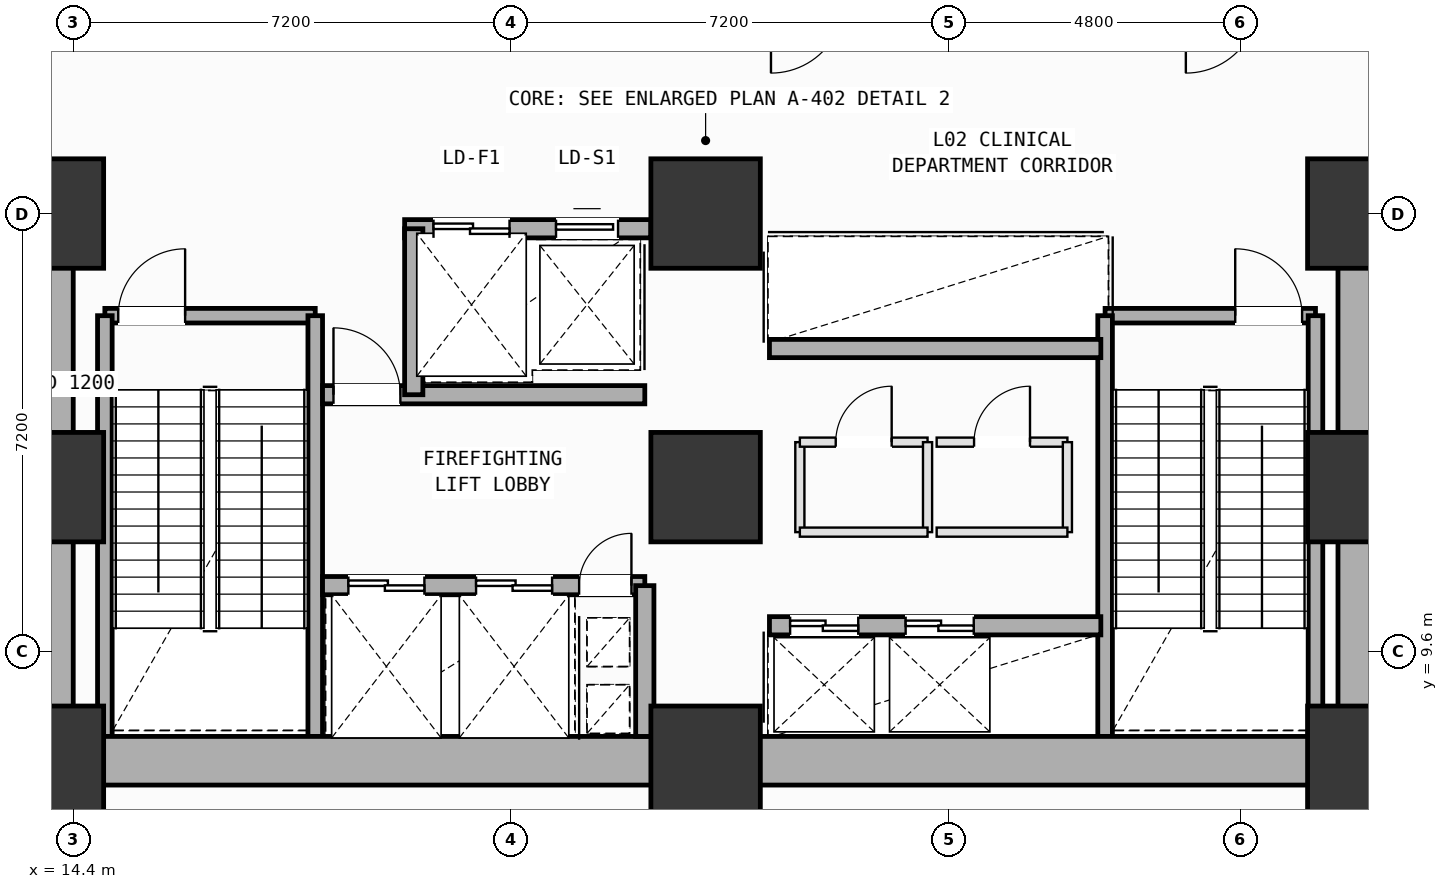
"""IFC4 building model, lengths in metres.
Left out: names, types, materials, properties, quantities, classifications, styles, units other than length and angle.
Written with IfcOpenShell. Run it as: python <this file> out.ifc"""

import sys

from ifc_helpers import new_model, si_unit, direction, frame, frame_2d, origin, origin_2d, place, context, subcontext, project, spatial, rectangle, extrude, element, fill, save


model = new_model("IFC4")
c1 = context("Model", 3, precision=1e-05, world=origin(), true_north=direction((0.0, 1.0)))
c2 = subcontext(c1, "Body", "Model", "MODEL_VIEW")
j1 = project(units=[si_unit("LENGTHUNIT", "METRE"), si_unit("PLANEANGLEUNIT", "RADIAN")], contexts=[c1])
p1 = place(None, origin())
s1 = spatial("IfcSite", under=j1, at=p1, CompositionType="ELEMENT")
p2 = place(p1, origin())
s2 = spatial("IfcBuilding", under=s1, at=p2, CompositionType="ELEMENT")
p3 = place(p2, frame((0.0, 0.0, 10.8)))
s3 = spatial("IfcBuildingStorey", under=s2, at=p3, CompositionType="ELEMENT", Elevation=10.8)
for number, where, z_axis, x_axis in (
    (1, (14.0, 7.8, 0.0), (0.0, 0.0, 1.0), (1.0, 0.0, 0.0)),
    (2, (14.0, 12.3, 0.0), (0.0, 0.0, 1.0), (1.0, 0.0, 0.0)),
    (3, (14.0, 16.8, 0.0), (0.0, 0.0, 1.0), (1.0, 0.0, 0.0)),
    (4, (24.8, 7.8, 0.0), (0.0, 0.0, 1.0), (1.0, 0.0, 0.0)),
    (5, (24.8, 12.3, 0.0), (0.0, 0.0, 1.0), (1.0, 0.0, 0.0)),
    (6, (24.8, 16.8, 0.0), (0.0, 0.0, 1.0), (1.0, 0.0, 0.0)),
    (7, (35.6, 7.8, 0.0), (0.0, 0.0, 1.0), (1.0, 0.0, 0.0)),
    (8, (35.6, 12.3, 0.0), (0.0, 0.0, 1.0), (1.0, 0.0, 0.0)),
    (9, (35.6, 16.8, 0.0), (0.0, 0.0, 1.0), (1.0, 0.0, 0.0)),
):
    element("IfcColumn", number, at=place(p3, frame(where, z_axis=z_axis, x_axis=x_axis)), inside=s3, PredefinedType="COLUMN", context=c2, shape_type="SweptSolid", body=[
        extrude(rectangle(XDim=1.8, YDim=1.8, at=origin_2d()), origin(), (0.0, 0.0, 1.0), 5.4),
    ])
p4 = place(p3, frame((14.92, 15.12, 0.0), z_axis=(0.0, 0.0, 1.0), x_axis=(1.0, 0.0, 0.0)))
e10 = element("IfcWall", 10, at=p4, inside=s3, PredefinedType="SOLIDWALL", context=c2, shape_type="SweptSolid", body=[
    extrude(rectangle(XDim=3.46, YDim=0.24, at=frame_2d((1.73, 0.0))), origin(), (0.0, 0.0, 1.0), 5.15),
])
p5 = place(p4, frame((0.22, 0.0, 0.0)))
e11 = element("IfcOpeningElement", 11, at=p5, cuts=e10, PredefinedType="OPENING", context=c2, shape_type="SweptSolid", body=[
    extrude(rectangle(XDim=1.1, YDim=2.15, at=frame_2d((0.55, 1.075))), frame((0.0, 0.13, 0.0), z_axis=(0.0, -1.0, 0.0), x_axis=(1.0, 0.0, 0.0)), (0.0, 0.0, 1.0), 0.26),
])
for number, where, z_axis, x_axis in (
    (12, (18.38, 15.12, 0.0), (0.0, 0.0, 1.0), (0.0, -1.0, 0.0)),
    (13, (14.92, 8.2, 0.0), (0.0, 0.0, 1.0), (0.0, 1.0, 0.0)),
):
    element("IfcWall", number, at=place(p3, frame(where, z_axis=z_axis, x_axis=x_axis)), inside=s3, PredefinedType="SOLIDWALL", context=c2, shape_type="SweptSolid", body=[
        extrude(rectangle(XDim=6.92, YDim=0.24, at=frame_2d((3.46, 0.0))), origin(), (0.0, 0.0, 1.0), 5.15),
    ])
p6 = place(p3, frame((31.37, 15.12, 0.0), z_axis=(0.0, 0.0, 1.0), x_axis=(1.0, 0.0, 0.0)))
e14 = element("IfcWall", 14, at=p6, inside=s3, PredefinedType="SOLIDWALL", context=c2, shape_type="SweptSolid", body=[
    extrude(rectangle(XDim=3.46, YDim=0.24, at=frame_2d((1.73, 0.0))), origin(), (0.0, 0.0, 1.0), 5.15),
])
p7 = place(p6, frame((2.14, 0.0, 0.0)))
e15 = element("IfcOpeningElement", 15, at=p7, cuts=e14, PredefinedType="OPENING", context=c2, shape_type="SweptSolid", body=[
    extrude(rectangle(XDim=1.1, YDim=2.15, at=frame_2d((0.55, 1.075))), frame((0.0, 0.13, 0.0), z_axis=(0.0, -1.0, 0.0), x_axis=(1.0, 0.0, 0.0)), (0.0, 0.0, 1.0), 0.26),
])
for number, where, z_axis, x_axis in (
    (16, (34.83, 15.12, 0.0), (0.0, 0.0, 1.0), (0.0, -1.0, 0.0)),
    (17, (31.37, 8.2, 0.0), (0.0, 0.0, 1.0), (0.0, 1.0, 0.0)),
):
    element("IfcWall", number, at=place(p3, frame(where, z_axis=z_axis, x_axis=x_axis)), inside=s3, PredefinedType="SOLIDWALL", context=c2, shape_type="SweptSolid", body=[
        extrude(rectangle(XDim=6.92, YDim=0.24, at=frame_2d((3.46, 0.0))), origin(), (0.0, 0.0, 1.0), 5.15),
    ])
for number, where, z_axis, x_axis in (
    (18, (14.0, 7.8, 0.0), (0.0, 0.0, 1.0), (1.0, 0.0, 0.0)),
    (19, (24.8, 7.8, 0.0), (0.0, 0.0, 1.0), (1.0, 0.0, 0.0)),
):
    element("IfcWall", number, at=place(p3, frame(where, z_axis=z_axis, x_axis=x_axis)), inside=s3, PredefinedType="SHEAR", context=c2, shape_type="SweptSolid", body=[
        extrude(rectangle(XDim=10.8, YDim=0.8, at=frame_2d((5.4, 0.0))), origin(), (0.0, 0.0, 1.0), 5.15),
    ])
for number, where, z_axis, x_axis in (
    (20, (35.6, 7.8, 0.0), (0.0, 0.0, 1.0), (0.0, 1.0, 0.0)),
    (21, (14.0, 16.8, 0.0), (0.0, 0.0, 1.0), (0.0, -1.0, 0.0)),
):
    element("IfcWall", number, at=place(p3, frame(where, z_axis=z_axis, x_axis=x_axis)), inside=s3, PredefinedType="SHEAR", context=c2, shape_type="SweptSolid", body=[
        extrude(rectangle(XDim=9.0, YDim=0.8, at=frame_2d((4.5, 0.0))), origin(), (0.0, 0.0, 1.0), 5.15),
    ])
p8 = place(p3, frame((19.85, 16.55, 0.0), z_axis=(0.0, 0.0, 1.0), x_axis=(1.0, 0.0, 0.0)))
e22 = element("IfcWall", 22, at=p8, inside=s3, PredefinedType="SOLIDWALL", context=c2, shape_type="SweptSolid", body=[
    extrude(rectangle(XDim=4.05, YDim=0.3, at=frame_2d((2.025, 0.0))), origin(), (0.0, 0.0, 1.0), 5.15),
])
p9 = place(p8, frame((0.475, 0.0, 0.0)))
e23 = element("IfcOpeningElement", 23, at=p9, cuts=e22, PredefinedType="OPENING", context=c2, shape_type="SweptSolid", body=[
    extrude(rectangle(XDim=1.25, YDim=2.18, at=frame_2d((0.625, 1.09))), frame((0.0, 0.16, 0.0), z_axis=(0.0, -1.0, 0.0), x_axis=(1.0, 0.0, 0.0)), (0.0, 0.0, 1.0), 0.32),
])
p10 = place(p8, frame((2.49, 0.0, 0.0)))
e24 = element("IfcOpeningElement", 24, at=p10, cuts=e22, PredefinedType="OPENING", context=c2, shape_type="SweptSolid", body=[
    extrude(rectangle(XDim=1.02, YDim=2.12, at=frame_2d((0.51, 1.06))), frame((0.0, 0.16, 0.0), z_axis=(0.0, -1.0, 0.0), x_axis=(1.0, 0.0, 0.0)), (0.0, 0.0, 1.0), 0.32),
])
p11 = place(p3, frame((18.5, 10.68, 0.0), z_axis=(0.0, 0.0, 1.0), x_axis=(1.0, 0.0, 0.0)))
e25 = element("IfcWall", 25, at=p11, inside=s3, PredefinedType="SOLIDWALL", context=c2, shape_type="SweptSolid", body=[
    extrude(rectangle(XDim=5.3, YDim=0.3, at=frame_2d((2.65, 0.0))), origin(), (0.0, 0.0, 1.0), 5.15),
])
p12 = place(p11, frame((4.22, 0.0, 0.0)))
e26 = element("IfcOpeningElement", 26, at=p12, cuts=e25, PredefinedType="OPENING", context=c2, shape_type="SweptSolid", body=[
    extrude(rectangle(XDim=0.86, YDim=2.06, at=frame_2d((0.43, 1.03))), frame((0.0, 0.16, 0.0), z_axis=(0.0, -1.0, 0.0), x_axis=(1.0, 0.0, 0.0)), (0.0, 0.0, 1.0), 0.32),
])
p13 = place(p11, frame((0.425, 0.0, 0.0)))
e27 = element("IfcOpeningElement", 27, at=p13, cuts=e25, PredefinedType="OPENING", context=c2, shape_type="SweptSolid", body=[
    extrude(rectangle(XDim=1.25, YDim=2.18, at=frame_2d((0.625, 1.09))), frame((0.0, 0.16, 0.0), z_axis=(0.0, -1.0, 0.0), x_axis=(1.0, 0.0, 0.0)), (0.0, 0.0, 1.0), 0.32),
])
p14 = place(p11, frame((2.525, 0.0, 0.0)))
e28 = element("IfcOpeningElement", 28, at=p14, cuts=e25, PredefinedType="OPENING", context=c2, shape_type="SweptSolid", body=[
    extrude(rectangle(XDim=1.25, YDim=2.18, at=frame_2d((0.625, 1.09))), frame((0.0, 0.16, 0.0), z_axis=(0.0, -1.0, 0.0), x_axis=(1.0, 0.0, 0.0)), (0.0, 0.0, 1.0), 0.32),
])
p15 = place(p3, frame((18.5, 13.82, 0.0), z_axis=(0.0, 0.0, 1.0), x_axis=(1.0, 0.0, 0.0)))
e29 = element("IfcWall", 29, at=p15, inside=s3, PredefinedType="SOLIDWALL", context=c2, shape_type="SweptSolid", body=[
    extrude(rectangle(XDim=5.3, YDim=0.3, at=frame_2d((2.65, 0.0))), origin(), (0.0, 0.0, 1.0), 5.15),
])
p16 = place(p15, frame((0.18, 0.0, 0.0)))
e30 = element("IfcOpeningElement", 30, at=p16, cuts=e29, PredefinedType="OPENING", context=c2, shape_type="SweptSolid", body=[
    extrude(rectangle(XDim=1.1, YDim=2.15, at=frame_2d((0.55, 1.075))), frame((0.0, 0.16, 0.0), z_axis=(0.0, -1.0, 0.0), x_axis=(1.0, 0.0, 0.0)), (0.0, 0.0, 1.0), 0.32),
])
p17 = place(p3, frame((23.8, 8.2, 0.0), z_axis=(0.0, 0.0, 1.0), x_axis=(0.0, 1.0, 0.0)))
e31 = element("IfcWall", 31, at=p17, inside=s3, PredefinedType="SOLIDWALL", context=c2, shape_type="SweptSolid", body=[
    extrude(rectangle(XDim=2.48, YDim=0.3, at=frame_2d((1.24, 0.0))), origin(), (0.0, 0.0, 1.0), 5.15),
])
p18 = place(p3, frame((20.0, 13.82, 0.0), z_axis=(0.0, 0.0, 1.0), x_axis=(0.0, 1.0, 0.0)))
e32 = element("IfcWall", 32, at=p18, inside=s3, PredefinedType="SOLIDWALL", context=c2, shape_type="SweptSolid", body=[
    extrude(rectangle(XDim=2.73, YDim=0.3, at=frame_2d((1.365, 0.0))), origin(), (0.0, 0.0, 1.0), 5.15),
])
p19 = place(p3, frame((25.85, 10.02, 0.0), z_axis=(0.0, 0.0, 1.0), x_axis=(1.0, 0.0, 0.0)))
e33 = element("IfcWall", 33, at=p19, inside=s3, PredefinedType="SOLIDWALL", context=c2, shape_type="SweptSolid", body=[
    extrude(rectangle(XDim=5.45, YDim=0.3, at=frame_2d((2.725, 0.0))), origin(), (0.0, 0.0, 1.0), 5.15),
])
p20 = place(p19, frame((0.34, 0.0, 0.0)))
e34 = element("IfcOpeningElement", 34, at=p20, cuts=e33, PredefinedType="OPENING", context=c2, shape_type="SweptSolid", body=[
    extrude(rectangle(XDim=1.12, YDim=2.15, at=frame_2d((0.56, 1.075))), frame((0.0, 0.16, 0.0), z_axis=(0.0, -1.0, 0.0), x_axis=(1.0, 0.0, 0.0)), (0.0, 0.0, 1.0), 0.32),
])
p21 = place(p19, frame((2.24, 0.0, 0.0)))
e35 = element("IfcOpeningElement", 35, at=p21, cuts=e33, PredefinedType="OPENING", context=c2, shape_type="SweptSolid", body=[
    extrude(rectangle(XDim=1.12, YDim=2.15, at=frame_2d((0.56, 1.075))), frame((0.0, 0.16, 0.0), z_axis=(0.0, -1.0, 0.0), x_axis=(1.0, 0.0, 0.0)), (0.0, 0.0, 1.0), 0.32),
])
p22 = place(p3, frame((25.85, 14.58, 0.0), z_axis=(0.0, 0.0, 1.0), x_axis=(1.0, 0.0, 0.0)))
e36 = element("IfcWall", 36, at=p22, inside=s3, PredefinedType="SOLIDWALL", context=c2, shape_type="SweptSolid", body=[
    extrude(rectangle(XDim=5.45, YDim=0.3, at=frame_2d((2.725, 0.0))), origin(), (0.0, 0.0, 1.0), 5.15),
])
p23 = place(p3, frame((26.35, 11.56, 0.0), z_axis=(0.0, 0.0, 1.0), x_axis=(0.0, 1.0, 0.0)))
e37 = element("IfcWall", 37, at=p23, inside=s3, PredefinedType="PARTITIONING", context=c2, shape_type="SweptSolid", body=[
    extrude(rectangle(XDim=1.48, YDim=0.15, at=frame_2d((0.74, 0.0))), origin(), (0.0, 0.0, 1.0), 5.15),
])
p24 = place(p3, frame((26.35, 13.04, 0.0), z_axis=(0.0, 0.0, 1.0), x_axis=(1.0, 0.0, 0.0)))
e38 = element("IfcWall", 38, at=p24, inside=s3, PredefinedType="PARTITIONING", context=c2, shape_type="SweptSolid", body=[
    extrude(rectangle(XDim=2.1, YDim=0.15, at=frame_2d((1.05, 0.0))), origin(), (0.0, 0.0, 1.0), 5.15),
])
p25 = place(p24, frame((0.59, 0.0, 0.0)))
e39 = element("IfcOpeningElement", 39, at=p25, cuts=e38, PredefinedType="OPENING", context=c2, shape_type="SweptSolid", body=[
    extrude(rectangle(XDim=0.92, YDim=2.1, at=frame_2d((0.46, 1.05))), frame((0.0, 0.085, 0.0), z_axis=(0.0, -1.0, 0.0), x_axis=(1.0, 0.0, 0.0)), (0.0, 0.0, 1.0), 0.17),
])
p26 = place(p3, frame((28.45, 13.04, 0.0), z_axis=(0.0, 0.0, 1.0), x_axis=(0.0, -1.0, 0.0)))
e40 = element("IfcWall", 40, at=p26, inside=s3, PredefinedType="PARTITIONING", context=c2, shape_type="SweptSolid", body=[
    extrude(rectangle(XDim=1.48, YDim=0.15, at=frame_2d((0.74, 0.0))), origin(), (0.0, 0.0, 1.0), 5.15),
])
p27 = place(p3, frame((28.45, 11.56, 0.0), z_axis=(0.0, 0.0, 1.0), x_axis=(-1.0, 0.0, 0.0)))
e41 = element("IfcWall", 41, at=p27, inside=s3, PredefinedType="PARTITIONING", context=c2, shape_type="SweptSolid", body=[
    extrude(rectangle(XDim=2.1, YDim=0.15, at=frame_2d((1.05, 0.0))), origin(), (0.0, 0.0, 1.0), 5.15),
])
p28 = place(p3, frame((28.6, 13.04, 0.0), z_axis=(0.0, 0.0, 1.0), x_axis=(1.0, 0.0, 0.0)))
e42 = element("IfcWall", 42, at=p28, inside=s3, PredefinedType="PARTITIONING", context=c2, shape_type="SweptSolid", body=[
    extrude(rectangle(XDim=2.15, YDim=0.15, at=frame_2d((1.075, 0.0))), origin(), (0.0, 0.0, 1.0), 5.15),
])
p29 = place(p28, frame((0.615, 0.0, 0.0)))
e43 = element("IfcOpeningElement", 43, at=p29, cuts=e42, PredefinedType="OPENING", context=c2, shape_type="SweptSolid", body=[
    extrude(rectangle(XDim=0.92, YDim=2.1, at=frame_2d((0.46, 1.05))), frame((0.0, 0.085, 0.0), z_axis=(0.0, -1.0, 0.0), x_axis=(1.0, 0.0, 0.0)), (0.0, 0.0, 1.0), 0.17),
])
p30 = place(p3, frame((30.75, 13.04, 0.0), z_axis=(0.0, 0.0, 1.0), x_axis=(0.0, -1.0, 0.0)))
e44 = element("IfcWall", 44, at=p30, inside=s3, PredefinedType="PARTITIONING", context=c2, shape_type="SweptSolid", body=[
    extrude(rectangle(XDim=1.48, YDim=0.15, at=frame_2d((0.74, 0.0))), origin(), (0.0, 0.0, 1.0), 5.15),
])
p31 = place(p3, frame((30.75, 11.56, 0.0), z_axis=(0.0, 0.0, 1.0), x_axis=(-1.0, 0.0, 0.0)))
e45 = element("IfcWall", 45, at=p31, inside=s3, PredefinedType="PARTITIONING", context=c2, shape_type="SweptSolid", body=[
    extrude(rectangle(XDim=2.15, YDim=0.15, at=frame_2d((1.075, 0.0))), origin(), (0.0, 0.0, 1.0), 5.15),
])
p32 = place(p5, origin())
e46 = element("IfcDoor", 46, at=p32, inside=s3, OperationType="SINGLE_SWING_RIGHT", PredefinedType="DOOR", context=c2, shape_type="SweptSolid", body=[
    extrude(rectangle(XDim=1.1, YDim=2.15, at=frame_2d((0.55, 1.075))), frame((0.0, 0.025, 0.0), z_axis=(0.0, -1.0, 0.0), x_axis=(1.0, 0.0, 0.0)), (0.0, 0.0, 1.0), 0.05),
])
fill(e11, e46)
p33 = place(p7, origin())
e47 = element("IfcDoor", 47, at=p33, inside=s3, OperationType="SINGLE_SWING_LEFT", PredefinedType="DOOR", context=c2, shape_type="SweptSolid", body=[
    extrude(rectangle(XDim=1.1, YDim=2.15, at=frame_2d((0.55, 1.075))), frame((0.0, 0.025, 0.0), z_axis=(0.0, -1.0, 0.0), x_axis=(1.0, 0.0, 0.0)), (0.0, 0.0, 1.0), 0.05),
])
fill(e15, e47)
p34 = place(p12, origin())
e48 = element("IfcDoor", 48, at=p34, inside=s3, OperationType="SINGLE_SWING_RIGHT", PredefinedType="DOOR", context=c2, shape_type="SweptSolid", body=[
    extrude(rectangle(XDim=0.86, YDim=2.06, at=frame_2d((0.43, 1.03))), frame((0.0, 0.025, 0.0), z_axis=(0.0, -1.0, 0.0), x_axis=(1.0, 0.0, 0.0)), (0.0, 0.0, 1.0), 0.05),
])
fill(e26, e48)
p35 = place(p16, origin())
e49 = element("IfcDoor", 49, at=p35, inside=s3, OperationType="SINGLE_SWING_LEFT", PredefinedType="DOOR", context=c2, shape_type="SweptSolid", body=[
    extrude(rectangle(XDim=1.1, YDim=2.15, at=frame_2d((0.55, 1.075))), frame((0.0, 0.025, 0.0), z_axis=(0.0, -1.0, 0.0), x_axis=(1.0, 0.0, 0.0)), (0.0, 0.0, 1.0), 0.05),
])
fill(e30, e49)
p36 = place(p13, origin())
e50 = element("IfcDoor", 50, at=p36, inside=s3, OperationType="DOUBLE_DOOR_SLIDING", PredefinedType="DOOR", context=c2, shape_type="SweptSolid", body=[
    extrude(rectangle(XDim=1.25, YDim=2.18, at=frame_2d((0.625, 1.09))), frame((0.0, 0.025, 0.0), z_axis=(0.0, -1.0, 0.0), x_axis=(1.0, 0.0, 0.0)), (0.0, 0.0, 1.0), 0.05),
])
fill(e27, e50)
p37 = place(p14, origin())
e51 = element("IfcDoor", 51, at=p37, inside=s3, OperationType="DOUBLE_DOOR_SLIDING", PredefinedType="DOOR", context=c2, shape_type="SweptSolid", body=[
    extrude(rectangle(XDim=1.25, YDim=2.18, at=frame_2d((0.625, 1.09))), frame((0.0, 0.025, 0.0), z_axis=(0.0, -1.0, 0.0), x_axis=(1.0, 0.0, 0.0)), (0.0, 0.0, 1.0), 0.05),
])
fill(e28, e51)
p38 = place(p20, origin())
e52 = element("IfcDoor", 52, at=p38, inside=s3, OperationType="DOUBLE_DOOR_SLIDING", PredefinedType="DOOR", context=c2, shape_type="SweptSolid", body=[
    extrude(rectangle(XDim=1.12, YDim=2.15, at=frame_2d((0.56, 1.075))), frame((0.0, 0.025, 0.0), z_axis=(0.0, -1.0, 0.0), x_axis=(1.0, 0.0, 0.0)), (0.0, 0.0, 1.0), 0.05),
])
fill(e34, e52)
p39 = place(p21, origin())
e53 = element("IfcDoor", 53, at=p39, inside=s3, OperationType="DOUBLE_DOOR_SLIDING", PredefinedType="DOOR", context=c2, shape_type="SweptSolid", body=[
    extrude(rectangle(XDim=1.12, YDim=2.15, at=frame_2d((0.56, 1.075))), frame((0.0, 0.025, 0.0), z_axis=(0.0, -1.0, 0.0), x_axis=(1.0, 0.0, 0.0)), (0.0, 0.0, 1.0), 0.05),
])
fill(e35, e53)
p40 = place(p9, origin())
e54 = element("IfcDoor", 54, at=p40, inside=s3, OperationType="DOUBLE_DOOR_SLIDING", PredefinedType="DOOR", context=c2, shape_type="SweptSolid", body=[
    extrude(rectangle(XDim=1.25, YDim=2.18, at=frame_2d((0.625, 1.09))), frame((0.0, 0.025, 0.0), z_axis=(0.0, -1.0, 0.0), x_axis=(1.0, 0.0, 0.0)), (0.0, 0.0, 1.0), 0.05),
])
fill(e23, e54)
p41 = place(p10, origin())
e55 = element("IfcDoor", 55, at=p41, inside=s3, OperationType="SLIDING_TO_LEFT", PredefinedType="DOOR", context=c2, shape_type="SweptSolid", body=[
    extrude(rectangle(XDim=1.02, YDim=2.12, at=frame_2d((0.51, 1.06))), frame((0.0, 0.025, 0.0), z_axis=(0.0, -1.0, 0.0), x_axis=(1.0, 0.0, 0.0)), (0.0, 0.0, 1.0), 0.05),
])
fill(e24, e55)
p42 = place(p25, origin())
e56 = element("IfcDoor", 56, at=p42, inside=s3, OperationType="SINGLE_SWING_RIGHT", PredefinedType="DOOR", context=c2, shape_type="SweptSolid", body=[
    extrude(rectangle(XDim=0.92, YDim=2.1, at=frame_2d((0.46, 1.05))), frame((0.0, 0.025, 0.0), z_axis=(0.0, -1.0, 0.0), x_axis=(1.0, 0.0, 0.0)), (0.0, 0.0, 1.0), 0.05),
])
fill(e39, e56)
p43 = place(p29, origin())
e57 = element("IfcDoor", 57, at=p43, inside=s3, OperationType="SINGLE_SWING_RIGHT", PredefinedType="DOOR", context=c2, shape_type="SweptSolid", body=[
    extrude(rectangle(XDim=0.92, YDim=2.1, at=frame_2d((0.46, 1.05))), frame((0.0, 0.025, 0.0), z_axis=(0.0, -1.0, 0.0), x_axis=(1.0, 0.0, 0.0)), (0.0, 0.0, 1.0), 0.05),
])
fill(e43, e57)
save(model, sys.argv[1])
